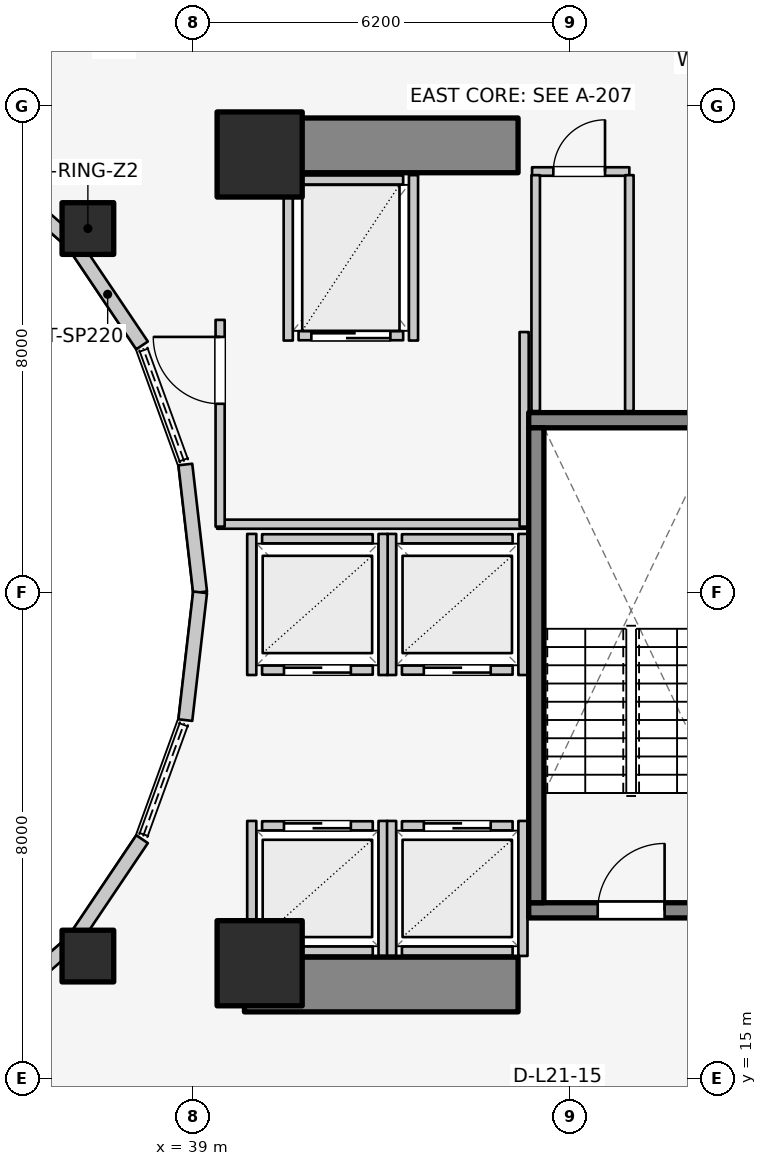
"""IFC4 building model, lengths in metres.
Left out: names, types, materials, properties, quantities, classifications, styles, units other than length and angle.
Written with IfcOpenShell. Run it as: python <this file> out.ifc"""

import sys

from ifc_helpers import new_model, si_unit, direction, frame, frame_2d, origin, origin_2d, place, context, subcontext, project, spatial, rectangle, extrude, element, fill, save


model = new_model("IFC4")
c1 = context("Model", 3, precision=1e-05, world=origin(), true_north=direction((0.0, 1.0)))
c2 = subcontext(c1, "Body", "Model", "MODEL_VIEW")
j1 = project(units=[si_unit("LENGTHUNIT", "METRE"), si_unit("PLANEANGLEUNIT", "RADIAN")], contexts=[c1])
p1 = place(None, origin())
s1 = spatial("IfcSite", under=j1, at=p1, CompositionType="ELEMENT")
p2 = place(p1, origin())
s2 = spatial("IfcBuilding", under=s1, at=p2, CompositionType="ELEMENT")
p3 = place(p2, frame((0.0, 0.0, 73.2)))
s3 = spatial("IfcBuildingStorey", under=s2, at=p3, CompositionType="ELEMENT", Elevation=73.2)
for number, where, z_axis, x_axis in (
    (1, (39.85, 16.55, 0.0), (0.0, 0.0, 1.0), (1.0, 0.0, 0.0)),
    (2, (39.85, 30.35, 0.0), (0.0, 0.0, 1.0), (1.0, 0.0, 0.0)),
):
    element("IfcWall", number, at=place(p3, frame(where, z_axis=z_axis, x_axis=x_axis)), inside=s3, PredefinedType="SHEAR", context=c2, shape_type="SweptSolid", body=[
        extrude(rectangle(XDim=4.5, YDim=0.9, at=frame_2d((2.25, 0.0))), origin(), (0.0, 0.0, 1.0), 3.1),
    ])
p4 = place(p3, frame((44.525, 17.77, 0.0), z_axis=(0.0, 0.0, 1.0), x_axis=(1.0, 0.0, 0.0)))
e3 = element("IfcWall", 3, at=p4, inside=s3, PredefinedType="SOLIDWALL", context=c2, shape_type="SweptSolid", body=[
    extrude(rectangle(XDim=3.37, YDim=0.25, at=frame_2d((1.685, 0.0))), origin(), (0.0, 0.0, 1.0), 3.1),
])
p5 = place(p4, frame((1.135, 0.0, 0.0)))
e4 = element("IfcOpeningElement", 4, at=p5, cuts=e3, PredefinedType="OPENING", context=c2, shape_type="SweptSolid", body=[
    extrude(rectangle(XDim=1.1, YDim=2.1, at=frame_2d((0.55, 1.05))), frame((0.0, 0.135, 0.0), z_axis=(0.0, -1.0, 0.0), x_axis=(1.0, 0.0, 0.0)), (0.0, 0.0, 1.0), 0.27),
])
p6 = place(p3, frame((44.525, 25.83, 0.0), z_axis=(0.0, 0.0, 1.0), x_axis=(1.0, 0.0, 0.0)))
e5 = element("IfcWall", 5, at=p6, inside=s3, PredefinedType="SOLIDWALL", context=c2, shape_type="SweptSolid", body=[
    extrude(rectangle(XDim=3.37, YDim=0.25, at=frame_2d((1.685, 0.0))), origin(), (0.0, 0.0, 1.0), 3.1),
])
p7 = place(p3, frame((44.65, 17.895, 0.0), z_axis=(0.0, 0.0, 1.0), x_axis=(0.0, 1.0, 0.0)))
e6 = element("IfcWall", 6, at=p7, inside=s3, PredefinedType="SOLIDWALL", context=c2, shape_type="SweptSolid", body=[
    extrude(rectangle(XDim=7.81, YDim=0.25, at=frame_2d((3.905, 0.0))), origin(), (0.0, 0.0, 1.0), 3.1),
])
for number, where, z_axis, x_axis in (
    (7, (40.1, 16.9, 0.0), (0.0, 0.0, 1.0), (1.0, 0.0, 0.0)),
    (8, (40.1, 30.2, 0.0), (0.0, 0.0, 1.0), (1.0, 0.0, 0.0)),
):
    element("IfcColumn", number, at=place(p3, frame(where, z_axis=z_axis, x_axis=x_axis)), inside=s3, PredefinedType="COLUMN", context=c2, shape_type="SweptSolid", body=[
        extrude(rectangle(XDim=1.4, YDim=1.4, at=origin_2d()), origin(), (0.0, 0.0, 1.0), 3.1),
    ])
for number, where, z_axis, x_axis in (
    (9, (37.275, 28.982, 0.0), (0.0, 0.0, 1.0), (1.0, 0.0, 0.0)),
    (10, (37.275, 17.018, 0.0), (0.0, 0.0, 1.0), (1.0, 0.0, 0.0)),
):
    element("IfcColumn", number, at=place(p3, frame(where, z_axis=z_axis, x_axis=x_axis)), inside=s3, PredefinedType="COLUMN", context=c2, shape_type="SweptSolid", body=[
        extrude(rectangle(XDim=0.85, YDim=0.85, at=origin_2d()), origin(), (0.0, 0.0, 1.0), 3.1),
    ])
p8 = place(p3, frame((39.12, 23.0, 0.0), z_axis=(0.0, 0.0, 1.0), x_axis=(-0.114711713601, 0.993398823617, 0.0)))
e11 = element("IfcWall", 11, at=p8, inside=s3, PredefinedType="STANDARD", context=c2, shape_type="SweptSolid", body=[
    extrude(rectangle(XDim=2.115, YDim=0.23, at=frame_2d((1.058, 0.0))), origin(), (0.0, 0.0, 1.0), 2.56),
])
p9 = place(p3, frame((38.166, 27.06, 0.0), z_axis=(0.0, 0.0, 1.0), x_axis=(-0.558197800898, 0.829707909492, 0.0)))
e12 = element("IfcWall", 12, at=p9, inside=s3, PredefinedType="STANDARD", context=c2, shape_type="SweptSolid", body=[
    extrude(rectangle(XDim=2.027, YDim=0.23, at=frame_2d((1.013, 0.0))), origin(), (0.0, 0.0, 1.0), 1.22),
])
for number, where, z_axis, x_axis in (
    (13, (37.035, 28.742, 0.0), (0.0, 0.0, 1.0), (-0.753, 0.659, 0.0)),
    (14, (35.56, 15.968, 0.0), (0.0, 0.0, 1.0), (0.753, 0.659, 0.0)),
):
    element("IfcWall", number, at=place(p3, frame(where, z_axis=z_axis, x_axis=x_axis)), inside=s3, PredefinedType="STANDARD", context=c2, shape_type="SweptSolid", body=[
        extrude(rectangle(XDim=1.959, YDim=0.23, at=frame_2d((0.98, 0.0))), origin(), (0.0, 0.0, 1.0), 1.22),
    ])
p10 = place(p3, frame((37.035, 17.258, 0.0), z_axis=(0.0, 0.0, 1.0), x_axis=(0.558197800898, 0.829707909492, 0.0)))
e15 = element("IfcWall", 15, at=p10, inside=s3, PredefinedType="STANDARD", context=c2, shape_type="SweptSolid", body=[
    extrude(rectangle(XDim=2.027, YDim=0.23, at=frame_2d((1.013, 0.0))), origin(), (0.0, 0.0, 1.0), 1.22),
])
p11 = place(p3, frame((38.877, 20.898, 0.0), z_axis=(0.0, 0.0, 1.0), x_axis=(0.114711713601, 0.993398823617, 0.0)))
e16 = element("IfcWall", 16, at=p11, inside=s3, PredefinedType="STANDARD", context=c2, shape_type="SweptSolid", body=[
    extrude(rectangle(XDim=2.115, YDim=0.23, at=frame_2d((1.058, 0.0))), origin(), (0.0, 0.0, 1.0), 2.56),
])
p12 = place(p3, frame((40.14, 19.16, 0.0), z_axis=(0.0, 0.0, 1.0), x_axis=(1.0, 0.0, 0.0)))
e17 = element("IfcWall", 17, at=p12, inside=s3, PredefinedType="SOLIDWALL", context=c2, shape_type="SweptSolid", body=[
    extrude(rectangle(XDim=1.82, YDim=0.15, at=frame_2d((0.91, 0.0))), origin(), (0.0, 0.0, 1.0), 2.12),
])
p13 = place(p12, frame((0.36, 0.0, 0.0)))
e18 = element("IfcOpeningElement", 18, at=p13, cuts=e17, PredefinedType="OPENING", context=c2, shape_type="SweptSolid", body=[
    extrude(rectangle(XDim=1.1, YDim=2.1, at=frame_2d((0.55, 1.05))), frame((0.0, 0.085, 0.0), z_axis=(0.0, -1.0, 0.0), x_axis=(1.0, 0.0, 0.0)), (0.0, 0.0, 1.0), 0.17),
])
p14 = place(p3, frame((40.14, 17.1, 0.0), z_axis=(0.0, 0.0, 1.0), x_axis=(1.0, 0.0, 0.0)))
e19 = element("IfcWall", 19, at=p14, inside=s3, PredefinedType="SOLIDWALL", context=c2, shape_type="SweptSolid", body=[
    extrude(rectangle(XDim=1.82, YDim=0.15, at=frame_2d((0.91, 0.0))), origin(), (0.0, 0.0, 1.0), 2.12),
])
p15 = place(p3, frame((39.97, 17.02, 0.0), z_axis=(0.0, 0.0, 1.0), x_axis=(0.0, 1.0, 0.0)))
e20 = element("IfcWall", 20, at=p15, inside=s3, PredefinedType="SOLIDWALL", context=c2, shape_type="SweptSolid", body=[
    extrude(rectangle(XDim=2.22, YDim=0.15, at=frame_2d((1.11, 0.0))), origin(), (0.0, 0.0, 1.0), 1.873),
])
p16 = place(p3, frame((42.13, 17.02, 0.0), z_axis=(0.0, 0.0, 1.0), x_axis=(0.0, 1.0, 0.0)))
e21 = element("IfcWall", 21, at=p16, inside=s3, PredefinedType="SOLIDWALL", context=c2, shape_type="SweptSolid", body=[
    extrude(rectangle(XDim=2.22, YDim=0.15, at=frame_2d((1.11, 0.0))), origin(), (0.0, 0.0, 1.0), 2.575),
])
p17 = place(p3, frame((42.44, 19.16, 0.0), z_axis=(0.0, 0.0, 1.0), x_axis=(1.0, 0.0, 0.0)))
e22 = element("IfcWall", 22, at=p17, inside=s3, PredefinedType="SOLIDWALL", context=c2, shape_type="SweptSolid", body=[
    extrude(rectangle(XDim=1.82, YDim=0.15, at=frame_2d((0.91, 0.0))), origin(), (0.0, 0.0, 1.0), 2.575),
])
p18 = place(p17, frame((0.36, 0.0, 0.0)))
e23 = element("IfcOpeningElement", 23, at=p18, cuts=e22, PredefinedType="OPENING", context=c2, shape_type="SweptSolid", body=[
    extrude(rectangle(XDim=1.1, YDim=2.1, at=frame_2d((0.55, 1.05))), frame((0.0, 0.085, 0.0), z_axis=(0.0, -1.0, 0.0), x_axis=(1.0, 0.0, 0.0)), (0.0, 0.0, 1.0), 0.17),
])
p19 = place(p3, frame((42.44, 17.1, 0.0), z_axis=(0.0, 0.0, 1.0), x_axis=(1.0, 0.0, 0.0)))
e24 = element("IfcWall", 24, at=p19, inside=s3, PredefinedType="SOLIDWALL", context=c2, shape_type="SweptSolid", body=[
    extrude(rectangle(XDim=1.82, YDim=0.15, at=frame_2d((0.91, 0.0))), origin(), (0.0, 0.0, 1.0), 2.575),
])
p20 = place(p3, frame((42.27, 17.02, 0.0), z_axis=(0.0, 0.0, 1.0), x_axis=(0.0, 1.0, 0.0)))
e25 = element("IfcWall", 25, at=p20, inside=s3, PredefinedType="SOLIDWALL", context=c2, shape_type="SweptSolid", body=[
    extrude(rectangle(XDim=2.22, YDim=0.15, at=frame_2d((1.11, 0.0))), origin(), (0.0, 0.0, 1.0), 2.575),
])
p21 = place(p3, frame((44.43, 17.02, 0.0), z_axis=(0.0, 0.0, 1.0), x_axis=(0.0, 1.0, 0.0)))
e26 = element("IfcWall", 26, at=p21, inside=s3, PredefinedType="SOLIDWALL", context=c2, shape_type="SweptSolid", body=[
    extrude(rectangle(XDim=2.22, YDim=0.15, at=frame_2d((1.11, 0.0))), origin(), (0.0, 0.0, 1.0), 2.12),
])
p22 = place(p3, frame((42.44, 21.72, 0.0), z_axis=(0.0, 0.0, 1.0), x_axis=(1.0, 0.0, 0.0)))
e27 = element("IfcWall", 27, at=p22, inside=s3, PredefinedType="SOLIDWALL", context=c2, shape_type="SweptSolid", body=[
    extrude(rectangle(XDim=1.82, YDim=0.15, at=frame_2d((0.91, 0.0))), origin(), (0.0, 0.0, 1.0), 2.575),
])
p23 = place(p22, frame((0.36, 0.0, 0.0)))
e28 = element("IfcOpeningElement", 28, at=p23, cuts=e27, PredefinedType="OPENING", context=c2, shape_type="SweptSolid", body=[
    extrude(rectangle(XDim=1.1, YDim=2.1, at=frame_2d((0.55, 1.05))), frame((0.0, 0.085, 0.0), z_axis=(0.0, -1.0, 0.0), x_axis=(1.0, 0.0, 0.0)), (0.0, 0.0, 1.0), 0.17),
])
p24 = place(p3, frame((42.44, 23.88, 0.0), z_axis=(0.0, 0.0, 1.0), x_axis=(1.0, 0.0, 0.0)))
e29 = element("IfcWall", 29, at=p24, inside=s3, PredefinedType="SOLIDWALL", context=c2, shape_type="SweptSolid", body=[
    extrude(rectangle(XDim=1.82, YDim=0.15, at=frame_2d((0.91, 0.0))), origin(), (0.0, 0.0, 1.0), 2.575),
])
for number, where, z_axis, x_axis in (
    (30, (42.27, 21.64, 0.0), (0.0, 0.0, 1.0), (0.0, 1.0, 0.0)),
    (31, (44.43, 21.64, 0.0), (0.0, 0.0, 1.0), (0.0, 1.0, 0.0)),
):
    element("IfcWall", number, at=place(p3, frame(where, z_axis=z_axis, x_axis=x_axis)), inside=s3, PredefinedType="SOLIDWALL", context=c2, shape_type="SweptSolid", body=[
        extrude(rectangle(XDim=2.32, YDim=0.15, at=frame_2d((1.16, 0.0))), origin(), (0.0, 0.0, 1.0), 2.575),
    ])
p25 = place(p3, frame((40.14, 21.72, 0.0), z_axis=(0.0, 0.0, 1.0), x_axis=(1.0, 0.0, 0.0)))
e32 = element("IfcWall", 32, at=p25, inside=s3, PredefinedType="SOLIDWALL", context=c2, shape_type="SweptSolid", body=[
    extrude(rectangle(XDim=1.82, YDim=0.15, at=frame_2d((0.91, 0.0))), origin(), (0.0, 0.0, 1.0), 2.12),
])
p26 = place(p25, frame((0.36, 0.0, 0.0)))
e33 = element("IfcOpeningElement", 33, at=p26, cuts=e32, PredefinedType="OPENING", context=c2, shape_type="SweptSolid", body=[
    extrude(rectangle(XDim=1.1, YDim=2.1, at=frame_2d((0.55, 1.05))), frame((0.0, 0.085, 0.0), z_axis=(0.0, -1.0, 0.0), x_axis=(1.0, 0.0, 0.0)), (0.0, 0.0, 1.0), 0.17),
])
p27 = place(p3, frame((40.14, 23.88, 0.0), z_axis=(0.0, 0.0, 1.0), x_axis=(1.0, 0.0, 0.0)))
e34 = element("IfcWall", 34, at=p27, inside=s3, PredefinedType="SOLIDWALL", context=c2, shape_type="SweptSolid", body=[
    extrude(rectangle(XDim=1.82, YDim=0.15, at=frame_2d((0.91, 0.0))), origin(), (0.0, 0.0, 1.0), 2.12),
])
p28 = place(p3, frame((39.97, 21.64, 0.0), z_axis=(0.0, 0.0, 1.0), x_axis=(0.0, 1.0, 0.0)))
e35 = element("IfcWall", 35, at=p28, inside=s3, PredefinedType="SOLIDWALL", context=c2, shape_type="SweptSolid", body=[
    extrude(rectangle(XDim=2.32, YDim=0.15, at=frame_2d((1.16, 0.0))), origin(), (0.0, 0.0, 1.0), 2.12),
])
p29 = place(p3, frame((42.13, 21.64, 0.0), z_axis=(0.0, 0.0, 1.0), x_axis=(0.0, 1.0, 0.0)))
e36 = element("IfcWall", 36, at=p29, inside=s3, PredefinedType="SOLIDWALL", context=c2, shape_type="SweptSolid", body=[
    extrude(rectangle(XDim=2.32, YDim=0.15, at=frame_2d((1.16, 0.0))), origin(), (0.0, 0.0, 1.0), 2.575),
])
p30 = place(p3, frame((40.74, 27.22, 0.0), z_axis=(0.0, 0.0, 1.0), x_axis=(1.0, 0.0, 0.0)))
e37 = element("IfcWall", 37, at=p30, inside=s3, PredefinedType="SOLIDWALL", context=c2, shape_type="SweptSolid", body=[
    extrude(rectangle(XDim=1.72, YDim=0.15, at=frame_2d((0.86, 0.0))), origin(), (0.0, 0.0, 1.0), 2.575),
])
p31 = place(p30, frame((0.21, 0.0, 0.0)))
e38 = element("IfcOpeningElement", 38, at=p31, cuts=e37, PredefinedType="OPENING", context=c2, shape_type="SweptSolid", body=[
    extrude(rectangle(XDim=1.3, YDim=2.1, at=frame_2d((0.65, 1.05))), frame((0.0, 0.085, 0.0), z_axis=(0.0, -1.0, 0.0), x_axis=(1.0, 0.0, 0.0)), (0.0, 0.0, 1.0), 0.17),
])
p32 = place(p3, frame((40.74, 29.78, 0.0), z_axis=(0.0, 0.0, 1.0), x_axis=(1.0, 0.0, 0.0)))
e39 = element("IfcWall", 39, at=p32, inside=s3, PredefinedType="SOLIDWALL", context=c2, shape_type="SweptSolid", body=[
    extrude(rectangle(XDim=1.72, YDim=0.15, at=frame_2d((0.86, 0.0))), origin(), (0.0, 0.0, 1.0), 2.575),
])
for number, where, z_axis, x_axis in (
    (40, (40.57, 27.14, 0.0), (0.0, 0.0, 1.0), (0.0, 1.0, 0.0)),
    (41, (42.63, 27.14, 0.0), (0.0, 0.0, 1.0), (0.0, 1.0, 0.0)),
):
    element("IfcWall", number, at=place(p3, frame(where, z_axis=z_axis, x_axis=x_axis)), inside=s3, PredefinedType="SOLIDWALL", context=c2, shape_type="SweptSolid", body=[
        extrude(rectangle(XDim=2.72, YDim=0.15, at=frame_2d((1.36, 0.0))), origin(), (0.0, 0.0, 1.0), 2.575),
    ])
p33 = place(p3, frame((39.4, 24.12, 0.0), z_axis=(0.0, 0.0, 1.0), x_axis=(1.0, 0.0, 0.0)))
e42 = element("IfcWall", 42, at=p33, inside=s3, PredefinedType="PARTITIONING", context=c2, shape_type="SweptSolid", body=[
    extrude(rectangle(XDim=5.08, YDim=0.15, at=frame_2d((2.54, 0.0))), origin(), (0.0, 0.0, 1.0), 2.12),
])
p34 = place(p3, frame((44.45, 24.08, 0.0), z_axis=(0.0, 0.0, 1.0), x_axis=(0.0, 1.0, 0.0)))
e43 = element("IfcWall", 43, at=p34, inside=s3, PredefinedType="PARTITIONING", context=c2, shape_type="SweptSolid", body=[
    extrude(rectangle(XDim=3.2, YDim=0.15, at=frame_2d((1.6, 0.0))), origin(), (0.0, 0.0, 1.0), 2.575),
])
p35 = place(p3, frame((39.45, 24.08, 0.0), z_axis=(0.0, 0.0, 1.0), x_axis=(0.0, 1.0, 0.0)))
e44 = element("IfcWall", 44, at=p35, inside=s3, PredefinedType="PARTITIONING", context=c2, shape_type="SweptSolid", body=[
    extrude(rectangle(XDim=3.4, YDim=0.15, at=frame_2d((1.7, 0.0))), origin(), (0.0, 0.0, 1.0), 2.575),
])
p36 = place(p35, frame((2.02, 0.0, 0.0)))
e45 = element("IfcOpeningElement", 45, at=p36, cuts=e44, PredefinedType="OPENING", context=c2, shape_type="SweptSolid", body=[
    extrude(rectangle(XDim=1.1, YDim=2.1, at=frame_2d((0.55, 1.05))), frame((0.0, 0.085, 0.0), z_axis=(0.0, -1.0, 0.0), x_axis=(1.0, 0.0, 0.0)), (0.0, 0.0, 1.0), 0.17),
])
p37 = place(p3, frame((44.58, 29.92, 0.0), z_axis=(0.0, 0.0, 1.0), x_axis=(1.0, 0.0, 0.0)))
e46 = element("IfcWall", 46, at=p37, inside=s3, PredefinedType="PLUMBINGWALL", context=c2, shape_type="SweptSolid", body=[
    extrude(rectangle(XDim=1.6, YDim=0.14, at=frame_2d((0.8, 0.0))), origin(), (0.0, 0.0, 1.0), 2.575),
])
p38 = place(p37, frame((0.35, 0.0, 0.0)))
e47 = element("IfcOpeningElement", 47, at=p38, cuts=e46, PredefinedType="OPENING", context=c2, shape_type="SweptSolid", body=[
    extrude(rectangle(XDim=0.85, YDim=2.05, at=frame_2d((0.425, 1.025))), frame((0.0, 0.08, 0.0), z_axis=(0.0, -1.0, 0.0), x_axis=(1.0, 0.0, 0.0)), (0.0, 0.0, 1.0), 0.16),
])
for number, where, z_axis, x_axis in (
    (48, (44.64, 25.98, 0.0), (0.0, 0.0, 1.0), (0.0, 1.0, 0.0)),
    (49, (46.18, 25.98, 0.0), (0.0, 0.0, 1.0), (0.0, 1.0, 0.0)),
):
    element("IfcWall", number, at=place(p3, frame(where, z_axis=z_axis, x_axis=x_axis)), inside=s3, PredefinedType="PLUMBINGWALL", context=c2, shape_type="SweptSolid", body=[
        extrude(rectangle(XDim=3.88, YDim=0.14, at=frame_2d((1.94, 0.0))), origin(), (0.0, 0.0, 1.0), 2.575),
    ])
p39 = place(p3, frame((46.757, 32.305, 0.0), z_axis=(0.0, 0.0, 1.0), x_axis=(0.867991349648, -0.496579315857, 0.0)))
e50 = element("IfcWall", 50, at=p39, inside=s3, PredefinedType="PARTITIONING", context=c2, shape_type="SweptSolid", body=[
    extrude(rectangle(XDim=2.567, YDim=0.15, at=frame_2d((1.283, 0.0))), origin(), (0.0, 0.0, 1.0), 1.22),
])
p40 = place(p5, origin())
e51 = element("IfcDoor", 51, at=p40, inside=s3, OperationType="SINGLE_SWING_RIGHT", PredefinedType="DOOR", context=c2, shape_type="SweptSolid", body=[
    extrude(rectangle(XDim=1.1, YDim=2.1, at=frame_2d((0.55, 1.05))), frame((0.0, 0.025, 0.0), z_axis=(0.0, -1.0, 0.0), x_axis=(1.0, 0.0, 0.0)), (0.0, 0.0, 1.0), 0.05),
])
fill(e4, e51)
p41 = place(p13, origin())
e52 = element("IfcDoor", 52, at=p41, inside=s3, OperationType="DOUBLE_DOOR_SLIDING", PredefinedType="DOOR", context=c2, shape_type="SweptSolid", body=[
    extrude(rectangle(XDim=1.1, YDim=2.1, at=frame_2d((0.55, 1.05))), frame((0.0, 0.025, 0.0), z_axis=(0.0, -1.0, 0.0), x_axis=(1.0, 0.0, 0.0)), (0.0, 0.0, 1.0), 0.05),
])
fill(e18, e52)
p42 = place(p18, origin())
e53 = element("IfcDoor", 53, at=p42, inside=s3, OperationType="DOUBLE_DOOR_SLIDING", PredefinedType="DOOR", context=c2, shape_type="SweptSolid", body=[
    extrude(rectangle(XDim=1.1, YDim=2.1, at=frame_2d((0.55, 1.05))), frame((0.0, 0.025, 0.0), z_axis=(0.0, -1.0, 0.0), x_axis=(1.0, 0.0, 0.0)), (0.0, 0.0, 1.0), 0.05),
])
fill(e23, e53)
p43 = place(p23, origin())
e54 = element("IfcDoor", 54, at=p43, inside=s3, OperationType="DOUBLE_DOOR_SLIDING", PredefinedType="DOOR", context=c2, shape_type="SweptSolid", body=[
    extrude(rectangle(XDim=1.1, YDim=2.1, at=frame_2d((0.55, 1.05))), frame((0.0, 0.025, 0.0), z_axis=(0.0, -1.0, 0.0), x_axis=(1.0, 0.0, 0.0)), (0.0, 0.0, 1.0), 0.05),
])
fill(e28, e54)
p44 = place(p26, origin())
e55 = element("IfcDoor", 55, at=p44, inside=s3, OperationType="DOUBLE_DOOR_SLIDING", PredefinedType="DOOR", context=c2, shape_type="SweptSolid", body=[
    extrude(rectangle(XDim=1.1, YDim=2.1, at=frame_2d((0.55, 1.05))), frame((0.0, 0.025, 0.0), z_axis=(0.0, -1.0, 0.0), x_axis=(1.0, 0.0, 0.0)), (0.0, 0.0, 1.0), 0.05),
])
fill(e33, e55)
p45 = place(p31, origin())
e56 = element("IfcDoor", 56, at=p45, inside=s3, OperationType="DOUBLE_DOOR_SLIDING", PredefinedType="DOOR", context=c2, shape_type="SweptSolid", body=[
    extrude(rectangle(XDim=1.3, YDim=2.1, at=frame_2d((0.65, 1.05))), frame((0.0, 0.025, 0.0), z_axis=(0.0, -1.0, 0.0), x_axis=(1.0, 0.0, 0.0)), (0.0, 0.0, 1.0), 0.05),
])
fill(e38, e56)
p46 = place(p36, origin())
e57 = element("IfcDoor", 57, at=p46, inside=s3, OperationType="SINGLE_SWING_RIGHT", PredefinedType="DOOR", context=c2, shape_type="SweptSolid", body=[
    extrude(rectangle(XDim=1.1, YDim=2.1, at=frame_2d((0.55, 1.05))), frame((0.0, 0.025, 0.0), z_axis=(0.0, -1.0, 0.0), x_axis=(1.0, 0.0, 0.0)), (0.0, 0.0, 1.0), 0.05),
])
fill(e45, e57)
p47 = place(p38, origin())
e58 = element("IfcDoor", 58, at=p47, inside=s3, OperationType="SINGLE_SWING_RIGHT", PredefinedType="DOOR", context=c2, shape_type="SweptSolid", body=[
    extrude(rectangle(XDim=0.85, YDim=2.05, at=frame_2d((0.425, 1.025))), frame((0.0, 0.025, 0.0), z_axis=(0.0, -1.0, 0.0), x_axis=(1.0, 0.0, 0.0)), (0.0, 0.0, 1.0), 0.05),
])
fill(e47, e58)
save(model, sys.argv[1])
